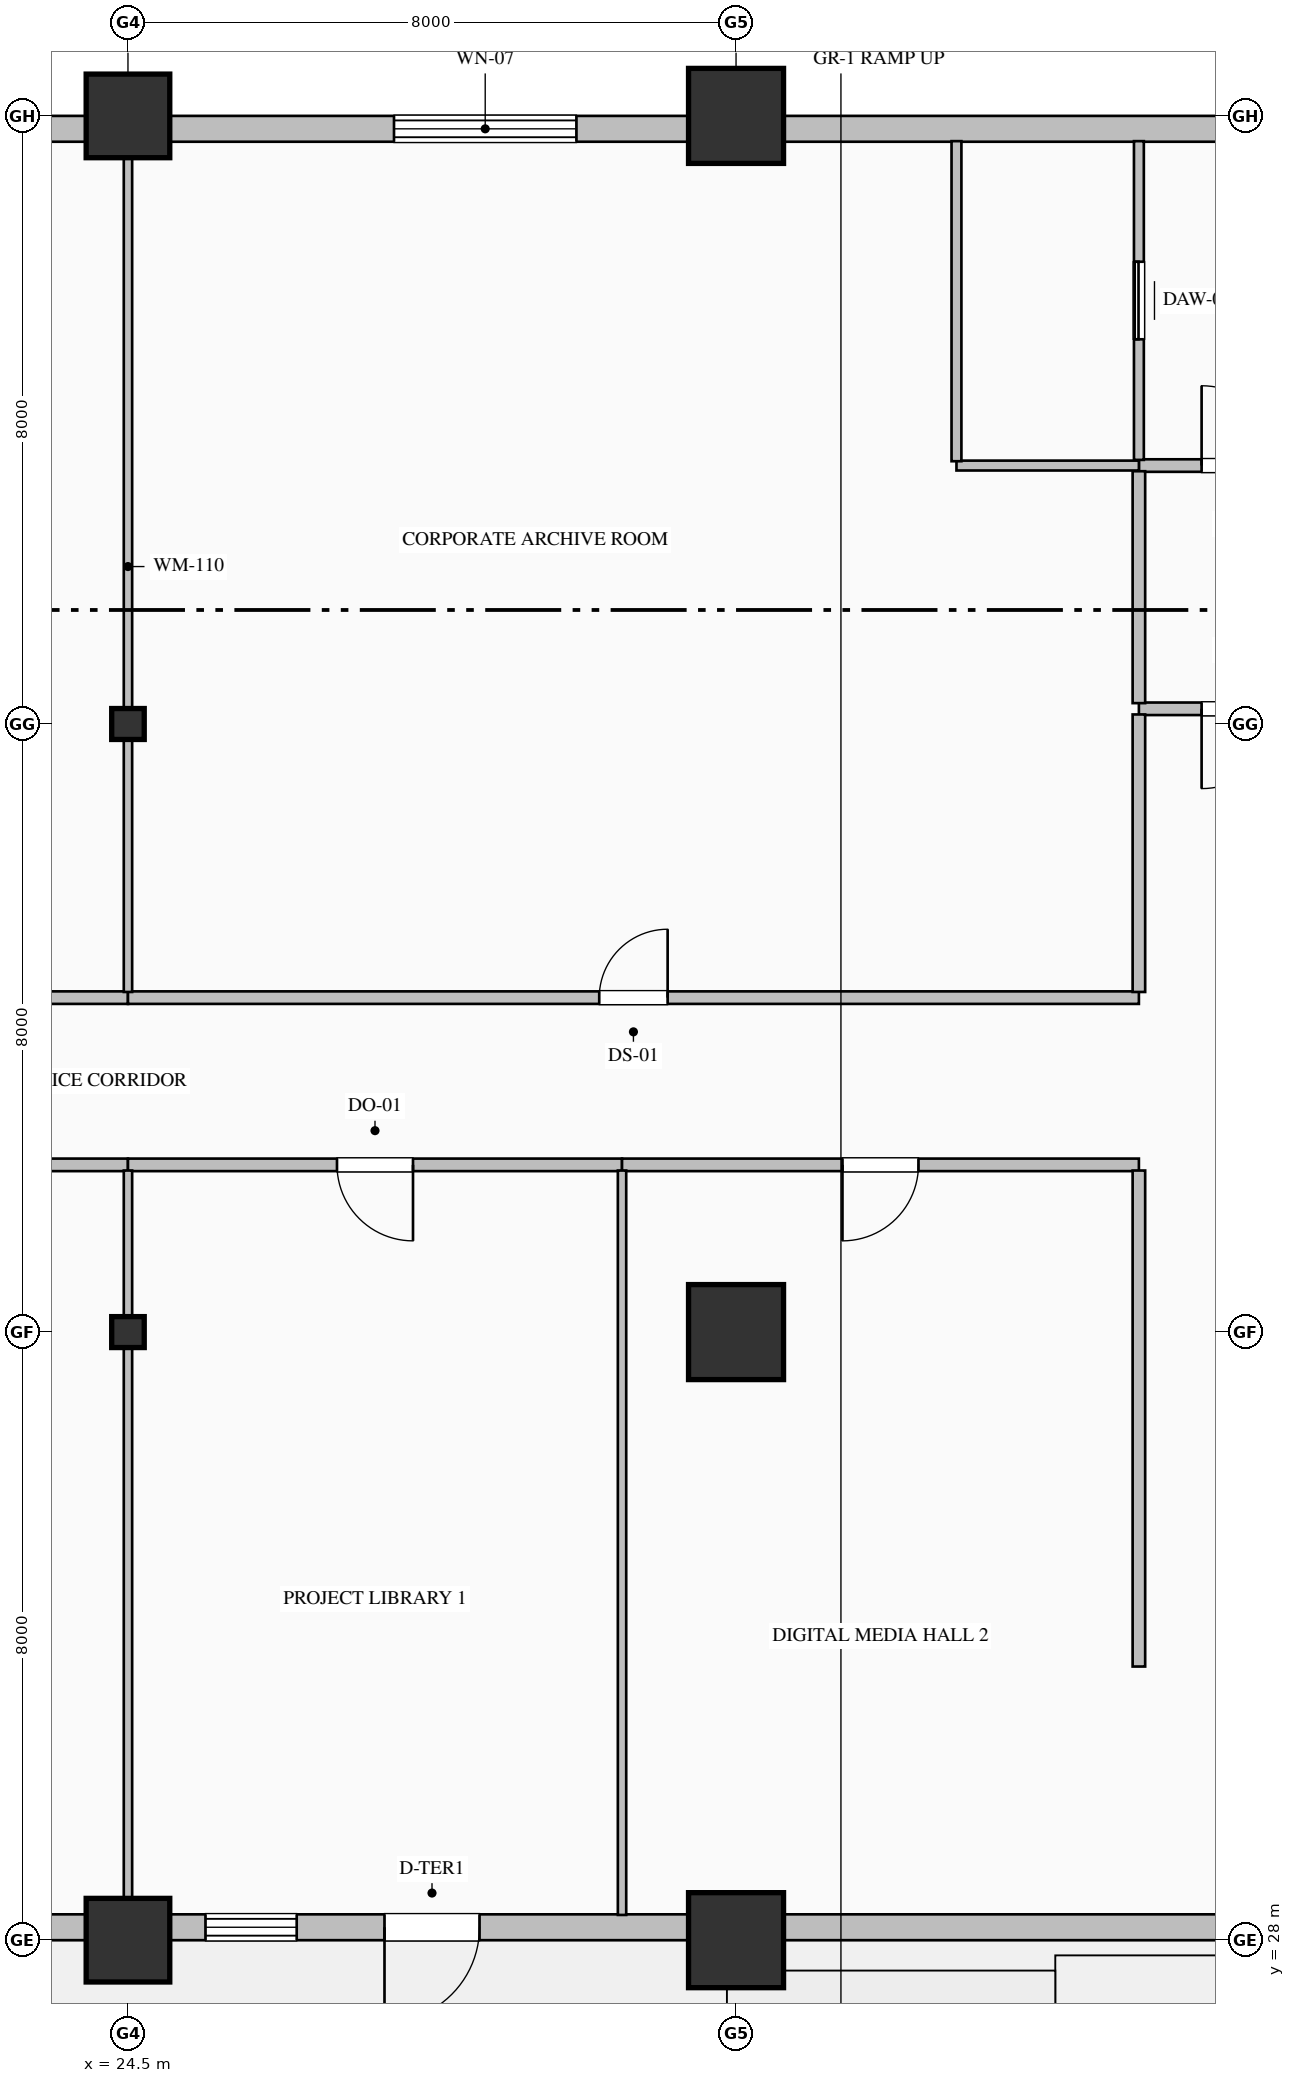
"""IFC4 building model, lengths in metres.
Left out: names, types, materials, properties, quantities, classifications, styles, units other than length and angle.
Written with IfcOpenShell. Run it as: python <this file> out.ifc"""

import sys

from ifc_helpers import new_model, si_unit, direction, frame, frame_2d, origin, origin_2d, place, context, subcontext, project, spatial, rectangle, hollow_rectangle, i_section, extrude, element, fill, save


model = new_model("IFC4")
c1 = context("Model", 3, precision=1e-05, world=origin(), true_north=direction((0.0, 1.0)))
c2 = subcontext(c1, "Body", "Model", "MODEL_VIEW")
j1 = project(units=[si_unit("LENGTHUNIT", "METRE"), si_unit("PLANEANGLEUNIT", "RADIAN")], contexts=[c1])
p1 = place(None, origin())
s1 = spatial("IfcSite", under=j1, at=p1, CompositionType="ELEMENT")
p2 = place(p1, origin())
s2 = spatial("IfcBuilding", under=s1, at=p2, CompositionType="ELEMENT")
p3 = place(p2, frame((0.0, 0.0, 64.2)))
s3 = spatial("IfcBuildingStorey", under=s2, at=p3, CompositionType="ELEMENT", Elevation=64.2)
p4 = place(p3, frame((24.5, 28.0, 0.0), z_axis=(0.0, 0.0, 1.0), x_axis=(1.0, 0.0, 0.0)))
e1 = element("IfcColumn", 1, at=p4, inside=s3, PredefinedType="COLUMN", context=c2, shape_type="SweptSolid", body=[
    extrude(hollow_rectangle(XDim=1.1, YDim=1.1, WallThickness=0.04, at=origin_2d()), origin(), (0.0, 0.0, 1.0), 4.0),
])
for number, where, z_axis, x_axis in (
    (2, (24.5, 36.0, 0.0), (0.0, 0.0, 1.0), (1.0, 0.0, 0.0)),
    (3, (24.5, 44.0, 0.0), (0.0, 0.0, 1.0), (1.0, 0.0, 0.0)),
):
    element("IfcColumn", number, at=place(p3, frame(where, z_axis=z_axis, x_axis=x_axis)), inside=s3, PredefinedType="COLUMN", context=c2, shape_type="SweptSolid", body=[
        extrude(i_section(OverallWidth=0.407, OverallDepth=0.428, WebThickness=0.02, FlangeThickness=0.035, FilletRadius=0.022, at=origin_2d()), origin(), (0.0, 0.0, 1.0), 4.0),
    ])
p5 = place(p3, frame((24.5, 52.0, 0.0), z_axis=(0.0, 0.0, 1.0), x_axis=(1.0, 0.0, 0.0)))
e4 = element("IfcColumn", 4, at=p5, inside=s3, PredefinedType="COLUMN", context=c2, shape_type="SweptSolid", body=[
    extrude(hollow_rectangle(XDim=1.1, YDim=1.1, WallThickness=0.04, at=origin_2d()), origin(), (0.0, 0.0, 1.0), 4.0),
])
for number, where, z_axis, x_axis in (
    (5, (32.5, 28.0, 0.0), (0.0, 0.0, 1.0), (1.0, 0.0, 0.0)),
    (6, (32.5, 36.0, 0.0), (0.0, 0.0, 1.0), (1.0, 0.0, 0.0)),
    (7, (32.5, 52.0, 0.0), (0.0, 0.0, 1.0), (1.0, 0.0, 0.0)),
):
    element("IfcColumn", number, at=place(p3, frame(where, z_axis=z_axis, x_axis=x_axis)), inside=s3, PredefinedType="COLUMN", context=c2, shape_type="SweptSolid", body=[
        extrude(hollow_rectangle(XDim=1.25, YDim=1.25, WallThickness=0.045, at=origin_2d()), origin(), (0.0, 0.0, 1.0), 4.0),
    ])
p6 = place(p3, frame((40.52, 28.17, 0.0), z_axis=(0.0, 0.0, 1.0), x_axis=(-1.0, 0.0, 0.0)))
e8 = element("IfcWall", 8, at=p6, inside=s3, PredefinedType="SOLIDWALL", context=c2, shape_type="SweptSolid", body=[
    extrude(rectangle(XDim=36.52, YDim=0.34, at=frame_2d((18.26, 0.0))), origin(), (0.0, 0.0, 1.0), 3.05),
])
p7 = place(p6, frame((13.8, 0.0, 0.7)))
e9 = element("IfcOpeningElement", 9, at=p7, cuts=e8, PredefinedType="OPENING", context=c2, shape_type="SweptSolid", body=[
    extrude(rectangle(XDim=1.2, YDim=1.85, at=frame_2d((0.6, 0.925))), frame((0.0, 0.18, 0.0), z_axis=(0.0, -1.0, 0.0), x_axis=(1.0, 0.0, 0.0)), (0.0, 0.0, 1.0), 0.36),
])
p8 = place(p6, frame((17.4, 0.0, 0.7)))
e10 = element("IfcOpeningElement", 10, at=p8, cuts=e8, PredefinedType="OPENING", context=c2, shape_type="SweptSolid", body=[
    extrude(rectangle(XDim=1.2, YDim=1.85, at=frame_2d((0.6, 0.925))), frame((0.0, 0.18, 0.0), z_axis=(0.0, -1.0, 0.0), x_axis=(1.0, 0.0, 0.0)), (0.0, 0.0, 1.0), 0.36),
])
p9 = place(p6, frame((21.0, 0.0, 0.7)))
e11 = element("IfcOpeningElement", 11, at=p9, cuts=e8, PredefinedType="OPENING", context=c2, shape_type="SweptSolid", body=[
    extrude(rectangle(XDim=1.2, YDim=1.85, at=frame_2d((0.6, 0.925))), frame((0.0, 0.18, 0.0), z_axis=(0.0, -1.0, 0.0), x_axis=(1.0, 0.0, 0.0)), (0.0, 0.0, 1.0), 0.36),
])
p10 = place(p6, frame((28.2, 0.0, 0.7)))
e12 = element("IfcOpeningElement", 12, at=p10, cuts=e8, PredefinedType="OPENING", context=c2, shape_type="SweptSolid", body=[
    extrude(rectangle(XDim=1.2, YDim=1.85, at=frame_2d((0.6, 0.925))), frame((0.0, 0.18, 0.0), z_axis=(0.0, -1.0, 0.0), x_axis=(1.0, 0.0, 0.0)), (0.0, 0.0, 1.0), 0.36),
])
p11 = place(p6, frame((11.395, 0.0, 0.0)))
e13 = element("IfcOpeningElement", 13, at=p11, cuts=e8, PredefinedType="OPENING", context=c2, shape_type="SweptSolid", body=[
    extrude(rectangle(XDim=1.25, YDim=2.25, at=frame_2d((0.625, 1.125))), frame((0.0, 0.18, 0.0), z_axis=(0.0, -1.0, 0.0), x_axis=(1.0, 0.0, 0.0)), (0.0, 0.0, 1.0), 0.36),
])
p12 = place(p3, frame((4.0, 51.83, 0.0), z_axis=(0.0, 0.0, 1.0), x_axis=(1.0, 0.0, 0.0)))
e14 = element("IfcWall", 14, at=p12, inside=s3, PredefinedType="SOLIDWALL", context=c2, shape_type="SweptSolid", body=[
    extrude(rectangle(XDim=36.52, YDim=0.34, at=frame_2d((18.26, 0.0))), origin(), (0.0, 0.0, 1.0), 3.25),
])
p13 = place(p12, frame((6.3, 0.0, 0.85)))
e15 = element("IfcOpeningElement", 15, at=p13, cuts=e14, PredefinedType="OPENING", context=c2, shape_type="SweptSolid", body=[
    extrude(rectangle(XDim=1.8, YDim=2.05, at=frame_2d((0.9, 1.025))), frame((0.0, 0.18, 0.0), z_axis=(0.0, -1.0, 0.0), x_axis=(1.0, 0.0, 0.0)), (0.0, 0.0, 1.0), 0.36),
])
p14 = place(p12, frame((17.1, 0.0, 0.85)))
e16 = element("IfcOpeningElement", 16, at=p14, cuts=e14, PredefinedType="OPENING", context=c2, shape_type="SweptSolid", body=[
    extrude(rectangle(XDim=1.8, YDim=2.05, at=frame_2d((0.9, 1.025))), frame((0.0, 0.18, 0.0), z_axis=(0.0, -1.0, 0.0), x_axis=(1.0, 0.0, 0.0)), (0.0, 0.0, 1.0), 0.36),
])
p15 = place(p12, frame((24.0, 0.0, 0.8)))
e17 = element("IfcOpeningElement", 17, at=p15, cuts=e14, PredefinedType="OPENING", context=c2, shape_type="SweptSolid", body=[
    extrude(rectangle(XDim=2.4, YDim=2.15, at=frame_2d((1.2, 1.075))), frame((0.0, 0.18, 0.0), z_axis=(0.0, -1.0, 0.0), x_axis=(1.0, 0.0, 0.0)), (0.0, 0.0, 1.0), 0.36),
])
p16 = place(p3, frame((37.8, 47.4, 0.0), z_axis=(0.0, 0.0, 1.0), x_axis=(1.0, 0.0, 0.0)))
e18 = element("IfcWall", 18, at=p16, inside=s3, PredefinedType="PARTITIONING", context=c2, shape_type="SweptSolid", body=[
    extrude(rectangle(XDim=2.7, YDim=0.165, at=frame_2d((1.35, 0.0))), origin(), (0.0, 0.0, 1.0), 3.75),
])
p17 = place(p16, frame((0.825, 0.0, 0.0)))
e19 = element("IfcOpeningElement", 19, at=p17, cuts=e18, PredefinedType="OPENING", context=c2, shape_type="SweptSolid", body=[
    extrude(rectangle(XDim=1.05, YDim=2.15, at=frame_2d((0.525, 1.075))), frame((0.0, 0.093, 0.0), z_axis=(0.0, -1.0, 0.0), x_axis=(1.0, 0.0, 0.0)), (0.0, 0.0, 1.0), 0.185),
])
p18 = place(p3, frame((40.5, 44.2, 0.0), z_axis=(0.0, 0.0, 1.0), x_axis=(-1.0, 0.0, 0.0)))
e20 = element("IfcWall", 20, at=p18, inside=s3, PredefinedType="PARTITIONING", context=c2, shape_type="SweptSolid", body=[
    extrude(rectangle(XDim=2.7, YDim=0.165, at=frame_2d((1.35, 0.0))), origin(), (0.0, 0.0, 1.0), 3.75),
])
p19 = place(p18, frame((0.825, 0.0, 0.0)))
e21 = element("IfcOpeningElement", 21, at=p19, cuts=e20, PredefinedType="OPENING", context=c2, shape_type="SweptSolid", body=[
    extrude(rectangle(XDim=1.05, YDim=2.15, at=frame_2d((0.525, 1.075))), frame((0.0, 0.093, 0.0), z_axis=(0.0, -1.0, 0.0), x_axis=(1.0, 0.0, 0.0)), (0.0, 0.0, 1.0), 0.185),
])
p20 = place(p3, frame((37.8, 44.274, 0.0), z_axis=(0.0, 0.0, 1.0), x_axis=(0.0, 1.0, 0.0)))
e22 = element("IfcWall", 22, at=p20, inside=s3, PredefinedType="PARTITIONING", context=c2, shape_type="SweptSolid", body=[
    extrude(rectangle(XDim=3.051, YDim=0.165, at=frame_2d((1.525, 0.0))), origin(), (0.0, 0.0, 1.0), 3.75),
])
p21 = place(p3, frame((37.8, 47.475, 0.0), z_axis=(0.0, 0.0, 1.0), x_axis=(0.0, 1.0, 0.0)))
e23 = element("IfcWall", 23, at=p21, inside=s3, PredefinedType="PARTITIONING", context=c2, shape_type="SweptSolid", body=[
    extrude(rectangle(XDim=4.193, YDim=0.13, at=frame_2d((2.097, 0.0))), origin(), (0.0, 0.0, 1.0), 3.75),
])
p22 = place(p21, frame((1.587, 0.0, 0.0)))
e24 = element("IfcOpeningElement", 24, at=p22, cuts=e23, PredefinedType="OPENING", context=c2, shape_type="SweptSolid", body=[
    extrude(rectangle(XDim=1.02, YDim=2.15, at=frame_2d((0.51, 1.075))), frame((0.0, 0.075, 0.0), z_axis=(0.0, -1.0, 0.0), x_axis=(1.0, 0.0, 0.0)), (0.0, 0.0, 1.0), 0.15),
])
p23 = place(p3, frame((37.8, 47.4, 0.0), z_axis=(0.0, 0.0, 1.0), x_axis=(-1.0, 0.0, 0.0)))
e25 = element("IfcWall", 25, at=p23, inside=s3, PredefinedType="PARTITIONING", context=c2, shape_type="SweptSolid", body=[
    extrude(rectangle(XDim=2.4, YDim=0.13, at=frame_2d((1.2, 0.0))), origin(), (0.0, 0.0, 1.0), 3.75),
])
p24 = place(p3, frame((35.4, 47.457, 0.0), z_axis=(0.0, 0.0, 1.0), x_axis=(0.0, 1.0, 0.0)))
e26 = element("IfcWall", 26, at=p24, inside=s3, PredefinedType="PARTITIONING", context=c2, shape_type="SweptSolid", body=[
    extrude(rectangle(XDim=4.211, YDim=0.13, at=frame_2d((2.105, 0.0))), origin(), (0.0, 0.0, 1.0), 3.75),
])
p25 = place(p3, frame((24.5, 38.2, 0.0), z_axis=(0.0, 0.0, 1.0), x_axis=(-1.0, 0.0, 0.0)))
e27 = element("IfcWall", 27, at=p25, inside=s3, PredefinedType="PARTITIONING", context=c2, shape_type="SweptSolid", body=[
    extrude(rectangle(XDim=15.5, YDim=0.165, at=frame_2d((7.75, 0.0))), origin(), (0.0, 0.0, 1.0), 3.75),
])
p26 = place(p25, frame((7.25, 0.0, 0.0)))
e28 = element("IfcOpeningElement", 28, at=p26, cuts=e27, PredefinedType="OPENING", context=c2, shape_type="SweptSolid", body=[
    extrude(rectangle(XDim=1.0, YDim=2.15, at=frame_2d((0.5, 1.075))), frame((0.0, 0.093, 0.0), z_axis=(0.0, -1.0, 0.0), x_axis=(1.0, 0.0, 0.0)), (0.0, 0.0, 1.0), 0.185),
])
p27 = place(p3, frame((9.0, 40.4, 0.0), z_axis=(0.0, 0.0, 1.0), x_axis=(1.0, 0.0, 0.0)))
e29 = element("IfcWall", 29, at=p27, inside=s3, PredefinedType="PARTITIONING", context=c2, shape_type="SweptSolid", body=[
    extrude(rectangle(XDim=15.5, YDim=0.165, at=frame_2d((7.75, 0.0))), origin(), (0.0, 0.0, 1.0), 3.75),
])
p28 = place(p3, frame((24.5, 40.4, 0.0), z_axis=(0.0, 0.0, 1.0), x_axis=(1.0, 0.0, 0.0)))
e30 = element("IfcWall", 30, at=p28, inside=s3, PredefinedType="PARTITIONING", context=c2, shape_type="SweptSolid", body=[
    extrude(rectangle(XDim=13.3, YDim=0.165, at=frame_2d((6.65, 0.0))), origin(), (0.0, 0.0, 1.0), 3.75),
])
p29 = place(p28, frame((6.2, 0.0, 0.0)))
e31 = element("IfcOpeningElement", 31, at=p29, cuts=e30, PredefinedType="OPENING", context=c2, shape_type="SweptSolid", body=[
    extrude(rectangle(XDim=0.9, YDim=2.15, at=frame_2d((0.45, 1.075))), frame((0.0, 0.093, 0.0), z_axis=(0.0, -1.0, 0.0), x_axis=(1.0, 0.0, 0.0)), (0.0, 0.0, 1.0), 0.185),
])
p30 = place(p3, frame((31.0, 38.2, 0.0), z_axis=(0.0, 0.0, 1.0), x_axis=(-1.0, 0.0, 0.0)))
e32 = element("IfcWall", 32, at=p30, inside=s3, PredefinedType="PARTITIONING", context=c2, shape_type="SweptSolid", body=[
    extrude(rectangle(XDim=6.5, YDim=0.165, at=frame_2d((3.25, 0.0))), origin(), (0.0, 0.0, 1.0), 3.75),
])
p31 = place(p30, frame((2.75, 0.0, 0.0)))
e33 = element("IfcOpeningElement", 33, at=p31, cuts=e32, PredefinedType="OPENING", context=c2, shape_type="SweptSolid", body=[
    extrude(rectangle(XDim=1.0, YDim=2.15, at=frame_2d((0.5, 1.075))), frame((0.0, 0.093, 0.0), z_axis=(0.0, -1.0, 0.0), x_axis=(1.0, 0.0, 0.0)), (0.0, 0.0, 1.0), 0.185),
])
p32 = place(p3, frame((37.8, 38.2, 0.0), z_axis=(0.0, 0.0, 1.0), x_axis=(-1.0, 0.0, 0.0)))
e34 = element("IfcWall", 34, at=p32, inside=s3, PredefinedType="PARTITIONING", context=c2, shape_type="SweptSolid", body=[
    extrude(rectangle(XDim=6.8, YDim=0.165, at=frame_2d((3.4, 0.0))), origin(), (0.0, 0.0, 1.0), 3.75),
])
p33 = place(p32, frame((2.9, 0.0, 0.0)))
e35 = element("IfcOpeningElement", 35, at=p33, cuts=e34, PredefinedType="OPENING", context=c2, shape_type="SweptSolid", body=[
    extrude(rectangle(XDim=1.0, YDim=2.15, at=frame_2d((0.5, 1.075))), frame((0.0, 0.093, 0.0), z_axis=(0.0, -1.0, 0.0), x_axis=(1.0, 0.0, 0.0)), (0.0, 0.0, 1.0), 0.185),
])
p34 = place(p3, frame((37.8, 40.475, 0.0), z_axis=(0.0, 0.0, 1.0), x_axis=(0.0, 1.0, 0.0)))
e36 = element("IfcWall", 36, at=p34, inside=s3, PredefinedType="PARTITIONING", context=c2, shape_type="SweptSolid", body=[
    extrude(rectangle(XDim=3.651, YDim=0.165, at=frame_2d((1.825, 0.0))), origin(), (0.0, 0.0, 1.0), 3.75),
])
p35 = place(p3, frame((37.8, 31.6, 0.0), z_axis=(0.0, 0.0, 1.0), x_axis=(0.0, 1.0, 0.0)))
e37 = element("IfcWall", 37, at=p35, inside=s3, PredefinedType="PARTITIONING", context=c2, shape_type="SweptSolid", body=[
    extrude(rectangle(XDim=6.525, YDim=0.165, at=frame_2d((3.263, 0.0))), origin(), (0.0, 0.0, 1.0), 3.75),
])
p36 = place(p3, frame((24.5, 51.668, 0.0), z_axis=(0.0, 0.0, 1.0), x_axis=(0.0, -1.0, 0.0)))
e38 = element("IfcWall", 38, at=p36, inside=s3, PredefinedType="MOVABLE", context=c2, shape_type="SweptSolid", body=[
    extrude(rectangle(XDim=11.193, YDim=0.11, at=frame_2d((5.597, 0.0))), origin(), (0.0, 0.0, 1.0), 3.042),
])
p37 = place(p3, frame((24.5, 38.125, 0.0), z_axis=(0.0, 0.0, 1.0), x_axis=(0.0, -1.0, 0.0)))
e39 = element("IfcWall", 39, at=p37, inside=s3, PredefinedType="MOVABLE", context=c2, shape_type="SweptSolid", body=[
    extrude(rectangle(XDim=9.793, YDim=0.11, at=frame_2d((4.897, 0.0))), origin(), (0.0, 0.0, 1.0), 3.042),
])
p38 = place(p3, frame((31.0, 38.125, 0.0), z_axis=(0.0, 0.0, 1.0), x_axis=(0.0, -1.0, 0.0)))
e40 = element("IfcWall", 40, at=p38, inside=s3, PredefinedType="MOVABLE", context=c2, shape_type="SweptSolid", body=[
    extrude(rectangle(XDim=9.793, YDim=0.11, at=frame_2d((4.897, 0.0))), origin(), (0.0, 0.0, 1.0), 3.75),
])
p39 = place(p7, origin())
e41 = element("IfcWindow", 41, at=p39, inside=s3, PartitioningType="DOUBLE_PANEL_VERTICAL", PredefinedType="WINDOW", context=c2, shape_type="SweptSolid", body=[
    extrude(rectangle(XDim=1.2, YDim=1.85, at=frame_2d((0.6, 0.925))), frame((0.0, 0.15, 0.0), z_axis=(0.0, -1.0, 0.0), x_axis=(1.0, 0.0, 0.0)), (0.0, 0.0, 1.0), 0.06),
])
fill(e9, e41)
p40 = place(p15, origin())
e42 = element("IfcWindow", 42, at=p40, inside=s3, PartitioningType="TRIPLE_PANEL_VERTICAL", PredefinedType="WINDOW", context=c2, shape_type="SweptSolid", body=[
    extrude(rectangle(XDim=2.4, YDim=2.15, at=frame_2d((1.2, 1.075))), frame((0.0, 0.15, 0.0), z_axis=(0.0, -1.0, 0.0), x_axis=(1.0, 0.0, 0.0)), (0.0, 0.0, 1.0), 0.06),
])
fill(e17, e42)
p41 = place(p11, origin())
e43 = element("IfcDoor", 43, at=p41, inside=s3, OperationType="SINGLE_SWING_RIGHT", PredefinedType="DOOR", context=c2, shape_type="SweptSolid", body=[
    extrude(rectangle(XDim=1.25, YDim=2.25, at=frame_2d((0.625, 1.125))), frame((0.0, 0.025, 0.0), z_axis=(0.0, -1.0, 0.0), x_axis=(1.0, 0.0, 0.0)), (0.0, 0.0, 1.0), 0.05),
])
fill(e13, e43)
p42 = place(p17, origin())
e44 = element("IfcDoor", 44, at=p42, inside=s3, OperationType="SINGLE_SWING_LEFT", PredefinedType="DOOR", context=c2, shape_type="SweptSolid", body=[
    extrude(rectangle(XDim=1.05, YDim=2.15, at=frame_2d((0.525, 1.075))), frame((0.0, 0.025, 0.0), z_axis=(0.0, -1.0, 0.0), x_axis=(1.0, 0.0, 0.0)), (0.0, 0.0, 1.0), 0.05),
])
fill(e19, e44)
p43 = place(p19, origin())
e45 = element("IfcDoor", 45, at=p43, inside=s3, OperationType="SINGLE_SWING_RIGHT", PredefinedType="DOOR", context=c2, shape_type="SweptSolid", body=[
    extrude(rectangle(XDim=1.05, YDim=2.15, at=frame_2d((0.525, 1.075))), frame((0.0, 0.025, 0.0), z_axis=(0.0, -1.0, 0.0), x_axis=(1.0, 0.0, 0.0)), (0.0, 0.0, 1.0), 0.05),
])
fill(e21, e45)
p44 = place(p22, origin())
e46 = element("IfcDoor", 46, at=p44, inside=s3, OperationType="SLIDING_TO_LEFT", PredefinedType="DOOR", context=c2, shape_type="SweptSolid", body=[
    extrude(rectangle(XDim=1.02, YDim=2.15, at=frame_2d((0.51, 1.075))), frame((0.0, 0.025, 0.0), z_axis=(0.0, -1.0, 0.0), x_axis=(1.0, 0.0, 0.0)), (0.0, 0.0, 1.0), 0.05),
])
fill(e24, e46)
p45 = place(p29, origin())
e47 = element("IfcDoor", 47, at=p45, inside=s3, OperationType="SINGLE_SWING_RIGHT", PredefinedType="DOOR", context=c2, shape_type="SweptSolid", body=[
    extrude(rectangle(XDim=0.9, YDim=2.15, at=frame_2d((0.45, 1.075))), frame((0.0, 0.025, 0.0), z_axis=(0.0, -1.0, 0.0), x_axis=(1.0, 0.0, 0.0)), (0.0, 0.0, 1.0), 0.05),
])
fill(e31, e47)
p46 = place(p31, origin())
e48 = element("IfcDoor", 48, at=p46, inside=s3, OperationType="SINGLE_SWING_LEFT", PredefinedType="DOOR", context=c2, shape_type="SweptSolid", body=[
    extrude(rectangle(XDim=1.0, YDim=2.15, at=frame_2d((0.5, 1.075))), frame((0.0, 0.025, 0.0), z_axis=(0.0, -1.0, 0.0), x_axis=(1.0, 0.0, 0.0)), (0.0, 0.0, 1.0), 0.05),
])
fill(e33, e48)
p47 = place(p33, origin())
e49 = element("IfcDoor", 49, at=p47, inside=s3, OperationType="SINGLE_SWING_RIGHT", PredefinedType="DOOR", context=c2, shape_type="SweptSolid", body=[
    extrude(rectangle(XDim=1.0, YDim=2.15, at=frame_2d((0.5, 1.075))), frame((0.0, 0.025, 0.0), z_axis=(0.0, -1.0, 0.0), x_axis=(1.0, 0.0, 0.0)), (0.0, 0.0, 1.0), 0.05),
])
fill(e35, e49)
save(model, sys.argv[1])
